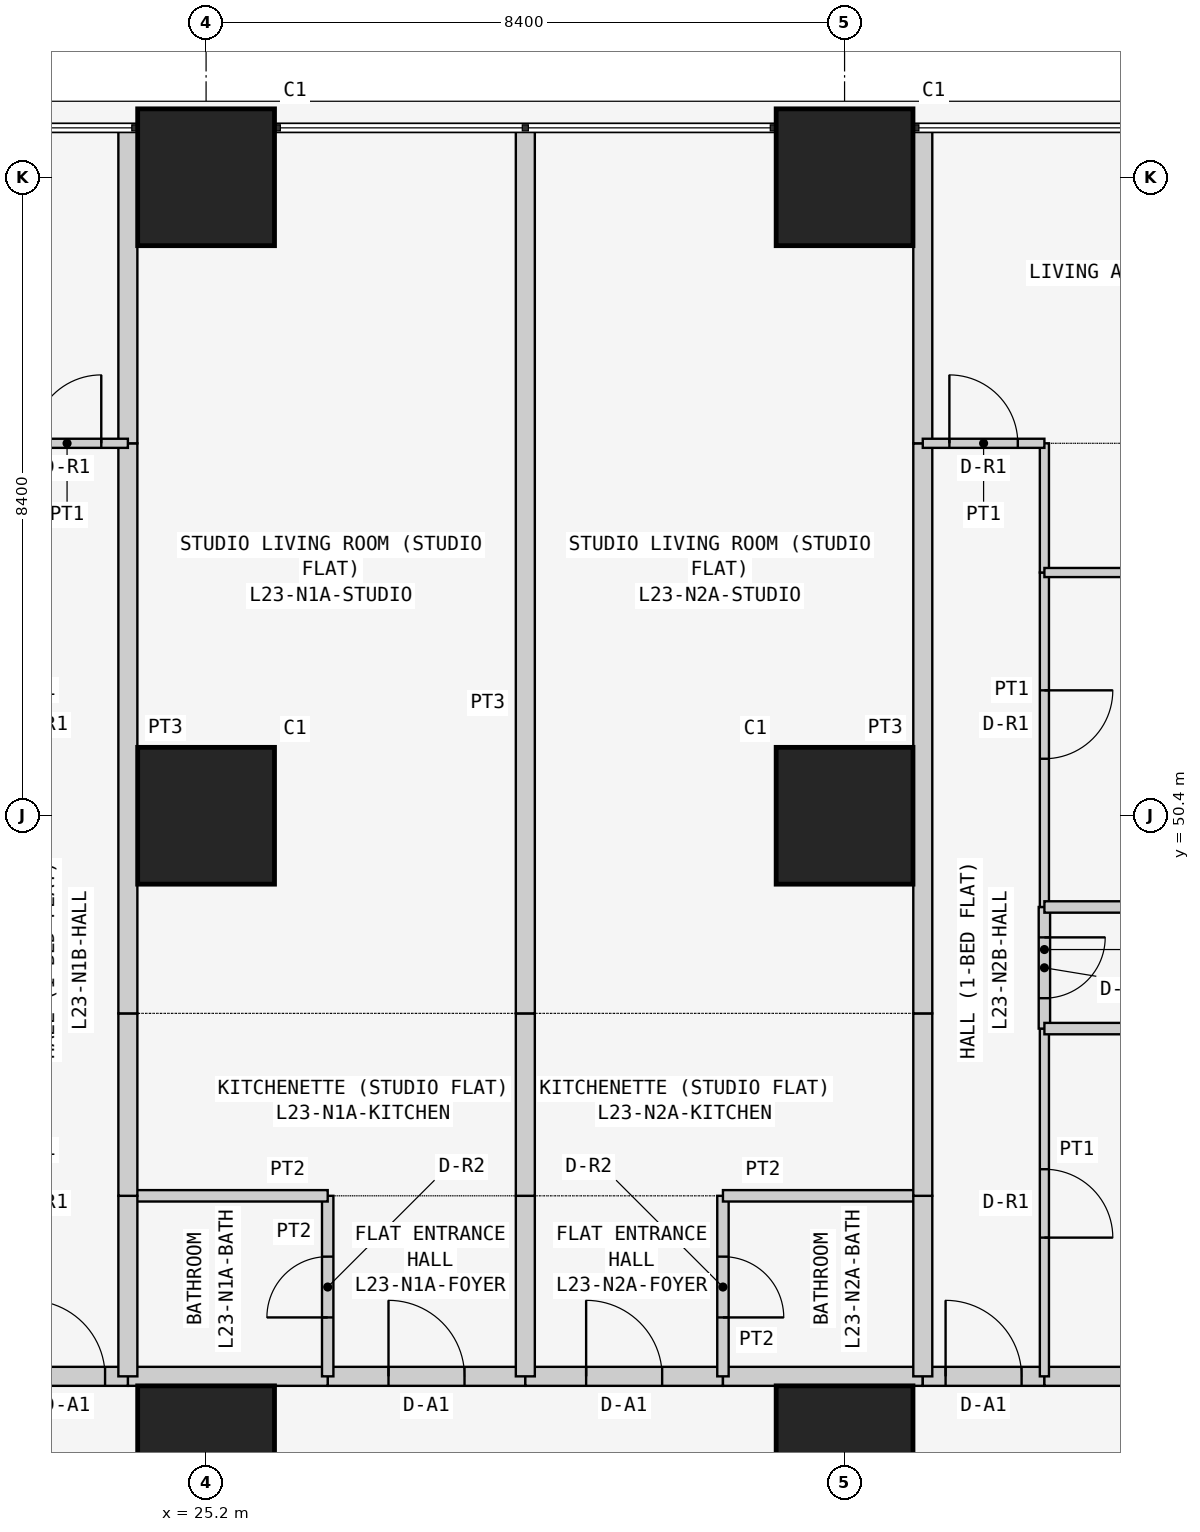
"""IFC4 building model, lengths in metres.
Left out: names, types, materials, properties, quantities, classifications, styles, units other than length and angle.
Written with IfcOpenShell. Run it as: python <this file> out.ifc"""

import sys

from ifc_helpers import new_model, si_unit, direction, frame, frame_2d, origin, origin_2d, place, context, subcontext, project, spatial, rectangle, extrude, element, fill, save


model = new_model("IFC4")
c1 = context("Model", 3, precision=1e-05, world=origin(), true_north=direction((0.0, 1.0)))
c2 = subcontext(c1, "Body", "Model", "MODEL_VIEW")
j1 = project(units=[si_unit("LENGTHUNIT", "METRE"), si_unit("PLANEANGLEUNIT", "RADIAN")], contexts=[c1])
p1 = place(None, origin())
s1 = spatial("IfcSite", under=j1, at=p1, CompositionType="ELEMENT")
p2 = place(p1, origin())
s2 = spatial("IfcBuilding", under=s1, at=p2, CompositionType="ELEMENT")
p3 = place(p2, frame((0.0, 0.0, 92.1)))
s3 = spatial("IfcBuildingStorey", under=s2, at=p3, CompositionType="ELEMENT", Elevation=92.1)
for number, where, z_axis, x_axis in (
    (1, (25.2, 42.0, 0.0), (0.0, 0.0, 1.0), (1.0, 0.0, 0.0)),
    (2, (25.2, 50.4, 0.0), (0.0, 0.0, 1.0), (1.0, 0.0, 0.0)),
    (3, (25.2, 58.8, 0.0), (0.0, 0.0, 1.0), (1.0, 0.0, 0.0)),
    (4, (33.6, 42.0, 0.0), (0.0, 0.0, 1.0), (1.0, 0.0, 0.0)),
    (5, (33.6, 50.4, 0.0), (0.0, 0.0, 1.0), (1.0, 0.0, 0.0)),
    (6, (33.6, 58.8, 0.0), (0.0, 0.0, 1.0), (1.0, 0.0, 0.0)),
):
    element("IfcColumn", number, at=place(p3, frame(where, z_axis=z_axis, x_axis=x_axis)), inside=s3, PredefinedType="COLUMN", context=c2, shape_type="SweptSolid", body=[
        extrude(rectangle(XDim=1.8, YDim=1.8, at=origin_2d()), origin(), (0.0, 0.0, 1.0), 3.6),
    ])
p4 = place(p3, frame((26.8, 43.025, 0.0), z_axis=(0.0, 0.0, 1.0), x_axis=(1.0, 0.0, 0.0)))
e7 = element("IfcWall", 7, at=p4, inside=s3, PredefinedType="PARTITIONING", context=c2, shape_type="SweptSolid", body=[
    extrude(rectangle(XDim=2.6, YDim=0.25, at=frame_2d((1.3, 0.0))), origin(), (0.0, 0.0, 1.0), 3.45),
])
p5 = place(p4, frame((0.8, 0.0, 0.0)))
e8 = element("IfcOpeningElement", 8, at=p5, cuts=e7, PredefinedType="OPENING", context=c2, shape_type="SweptSolid", body=[
    extrude(rectangle(XDim=1.0, YDim=2.1, at=frame_2d((0.5, 1.05))), frame((0.0, 0.135, 0.0), z_axis=(0.0, -1.0, 0.0), x_axis=(1.0, 0.0, 0.0)), (0.0, 0.0, 1.0), 0.27),
])
p6 = place(p3, frame((24.171, 43.025, 0.0), z_axis=(0.0, 0.0, 1.0), x_axis=(1.0, 0.0, 0.0)))
e9 = element("IfcWall", 9, at=p6, inside=s3, PredefinedType="PARTITIONING", context=c2, shape_type="SweptSolid", body=[
    extrude(rectangle(XDim=2.629, YDim=0.25, at=frame_2d((1.314, 0.0))), origin(), (0.0, 0.0, 1.0), 3.45),
])
p7 = place(p3, frame((22.571, 43.025, 0.0), z_axis=(0.0, 0.0, 1.0), x_axis=(1.0, 0.0, 0.0)))
e10 = element("IfcWall", 10, at=p7, inside=s3, PredefinedType="PARTITIONING", context=c2, shape_type="SweptSolid", body=[
    extrude(rectangle(XDim=1.6, YDim=0.25, at=frame_2d((0.8, 0.0))), origin(), (0.0, 0.0, 1.0), 3.45),
])
p8 = place(p7, frame((0.3, 0.0, 0.0)))
e11 = element("IfcOpeningElement", 11, at=p8, cuts=e10, PredefinedType="OPENING", context=c2, shape_type="SweptSolid", body=[
    extrude(rectangle(XDim=1.0, YDim=2.1, at=frame_2d((0.5, 1.05))), frame((0.0, 0.135, 0.0), z_axis=(0.0, -1.0, 0.0), x_axis=(1.0, 0.0, 0.0)), (0.0, 0.0, 1.0), 0.27),
])
p9 = place(p3, frame((29.4, 43.025, 0.0), z_axis=(0.0, 0.0, 1.0), x_axis=(1.0, 0.0, 0.0)))
e12 = element("IfcWall", 12, at=p9, inside=s3, PredefinedType="PARTITIONING", context=c2, shape_type="SweptSolid", body=[
    extrude(rectangle(XDim=2.6, YDim=0.25, at=frame_2d((1.3, 0.0))), origin(), (0.0, 0.0, 1.0), 3.45),
])
p10 = place(p9, frame((0.8, 0.0, 0.0)))
e13 = element("IfcOpeningElement", 13, at=p10, cuts=e12, PredefinedType="OPENING", context=c2, shape_type="SweptSolid", body=[
    extrude(rectangle(XDim=1.0, YDim=2.1, at=frame_2d((0.5, 1.05))), frame((0.0, 0.135, 0.0), z_axis=(0.0, -1.0, 0.0), x_axis=(1.0, 0.0, 0.0)), (0.0, 0.0, 1.0), 0.27),
])
p11 = place(p3, frame((32.0, 43.025, 0.0), z_axis=(0.0, 0.0, 1.0), x_axis=(1.0, 0.0, 0.0)))
e14 = element("IfcWall", 14, at=p11, inside=s3, PredefinedType="PARTITIONING", context=c2, shape_type="SweptSolid", body=[
    extrude(rectangle(XDim=2.629, YDim=0.25, at=frame_2d((1.314, 0.0))), origin(), (0.0, 0.0, 1.0), 3.45),
])
p12 = place(p3, frame((34.629, 43.025, 0.0), z_axis=(0.0, 0.0, 1.0), x_axis=(1.0, 0.0, 0.0)))
e15 = element("IfcWall", 15, at=p12, inside=s3, PredefinedType="PARTITIONING", context=c2, shape_type="SweptSolid", body=[
    extrude(rectangle(XDim=1.6, YDim=0.25, at=frame_2d((0.8, 0.0))), origin(), (0.0, 0.0, 1.0), 3.45),
])
p13 = place(p12, frame((0.3, 0.0, 0.0)))
e16 = element("IfcOpeningElement", 16, at=p13, cuts=e15, PredefinedType="OPENING", context=c2, shape_type="SweptSolid", body=[
    extrude(rectangle(XDim=1.0, YDim=2.1, at=frame_2d((0.5, 1.05))), frame((0.0, 0.135, 0.0), z_axis=(0.0, -1.0, 0.0), x_axis=(1.0, 0.0, 0.0)), (0.0, 0.0, 1.0), 0.27),
])
p14 = place(p3, frame((36.229, 43.025, 0.0), z_axis=(0.0, 0.0, 1.0), x_axis=(1.0, 0.0, 0.0)))
e17 = element("IfcWall", 17, at=p14, inside=s3, PredefinedType="PARTITIONING", context=c2, shape_type="SweptSolid", body=[
    extrude(rectangle(XDim=6.471, YDim=0.25, at=frame_2d((3.235, 0.0))), origin(), (0.0, 0.0, 1.0), 3.45),
])
p15 = place(p3, frame((26.8, 45.4, 0.0), z_axis=(0.0, 0.0, 1.0), x_axis=(0.0, -1.0, 0.0)))
e18 = element("IfcWall", 18, at=p15, inside=s3, PredefinedType="PARTITIONING", context=c2, shape_type="SweptSolid", body=[
    extrude(rectangle(XDim=2.375, YDim=0.15, at=frame_2d((1.188, 0.0))), origin(), (0.0, 0.0, 1.0), 3.45),
])
p16 = place(p15, frame((0.8, 0.0, 0.0)))
e19 = element("IfcOpeningElement", 19, at=p16, cuts=e18, PredefinedType="OPENING", context=c2, shape_type="SweptSolid", body=[
    extrude(rectangle(XDim=0.8, YDim=2.1, at=frame_2d((0.4, 1.05))), frame((0.0, 0.085, 0.0), z_axis=(0.0, -1.0, 0.0), x_axis=(1.0, 0.0, 0.0)), (0.0, 0.0, 1.0), 0.17),
])
p17 = place(p3, frame((29.4, 43.025, 0.0), z_axis=(0.0, 0.0, 1.0), x_axis=(0.0, 1.0, 0.0)))
e20 = element("IfcWall", 20, at=p17, inside=s3, PredefinedType="PARTITIONING", context=c2, shape_type="SweptSolid", body=[
    extrude(rectangle(XDim=2.375, YDim=0.25, at=frame_2d((1.188, 0.0))), origin(), (0.0, 0.0, 1.0), 2.848),
])
p18 = place(p3, frame((26.8, 45.4, 0.0), z_axis=(0.0, 0.0, 1.0), x_axis=(-1.0, 0.0, 0.0)))
e21 = element("IfcWall", 21, at=p18, inside=s3, PredefinedType="PARTITIONING", context=c2, shape_type="SweptSolid", body=[
    extrude(rectangle(XDim=2.629, YDim=0.15, at=frame_2d((1.314, 0.0))), origin(), (0.0, 0.0, 1.0), 3.45),
])
p19 = place(p3, frame((24.171, 45.4, 0.0), z_axis=(0.0, 0.0, 1.0), x_axis=(0.0, -1.0, 0.0)))
e22 = element("IfcWall", 22, at=p19, inside=s3, PredefinedType="PARTITIONING", context=c2, shape_type="SweptSolid", body=[
    extrude(rectangle(XDim=2.375, YDim=0.25, at=frame_2d((1.188, 0.0))), origin(), (0.0, 0.0, 1.0), 3.45),
])
p20 = place(p3, frame((24.171, 47.8, 0.0), z_axis=(0.0, 0.0, 1.0), x_axis=(0.0, -1.0, 0.0)))
e23 = element("IfcWall", 23, at=p20, inside=s3, PredefinedType="PARTITIONING", context=c2, shape_type="SweptSolid", body=[
    extrude(rectangle(XDim=2.4, YDim=0.25, at=frame_2d((1.2, 0.0))), origin(), (0.0, 0.0, 1.0), 3.45),
])
p21 = place(p3, frame((29.4, 45.4, 0.0), z_axis=(0.0, 0.0, 1.0), x_axis=(0.0, 1.0, 0.0)))
e24 = element("IfcWall", 24, at=p21, inside=s3, PredefinedType="PARTITIONING", context=c2, shape_type="SweptSolid", body=[
    extrude(rectangle(XDim=2.4, YDim=0.25, at=frame_2d((1.2, 0.0))), origin(), (0.0, 0.0, 1.0), 2.848),
])
p22 = place(p3, frame((24.171, 55.3, 0.0), z_axis=(0.0, 0.0, 1.0), x_axis=(0.0, -1.0, 0.0)))
e25 = element("IfcWall", 25, at=p22, inside=s3, PredefinedType="PARTITIONING", context=c2, shape_type="SweptSolid", body=[
    extrude(rectangle(XDim=7.5, YDim=0.25, at=frame_2d((3.75, 0.0))), origin(), (0.0, 0.0, 1.0), 3.45),
])
p23 = place(p3, frame((24.171, 59.45, 0.0), z_axis=(0.0, 0.0, 1.0), x_axis=(0.0, -1.0, 0.0)))
e26 = element("IfcWall", 26, at=p23, inside=s3, PredefinedType="PARTITIONING", context=c2, shape_type="SweptSolid", body=[
    extrude(rectangle(XDim=4.15, YDim=0.25, at=frame_2d((2.075, 0.0))), origin(), (0.0, 0.0, 1.0), 3.45),
])
p24 = place(p3, frame((29.4, 47.8, 0.0), z_axis=(0.0, 0.0, 1.0), x_axis=(0.0, 1.0, 0.0)))
e27 = element("IfcWall", 27, at=p24, inside=s3, PredefinedType="PARTITIONING", context=c2, shape_type="SweptSolid", body=[
    extrude(rectangle(XDim=11.65, YDim=0.25, at=frame_2d((5.825, 0.0))), origin(), (0.0, 0.0, 1.0), 2.848),
])
p25 = place(p3, frame((24.171, 55.3, 0.0), z_axis=(0.0, 0.0, 1.0), x_axis=(-1.0, 0.0, 0.0)))
e28 = element("IfcWall", 28, at=p25, inside=s3, PredefinedType="PARTITIONING", context=c2, shape_type="SweptSolid", body=[
    extrude(rectangle(XDim=1.6, YDim=0.12, at=frame_2d((0.8, 0.0))), origin(), (0.0, 0.0, 1.0), 3.45),
])
p26 = place(p25, frame((0.35, 0.0, 0.0)))
e29 = element("IfcOpeningElement", 29, at=p26, cuts=e28, PredefinedType="OPENING", context=c2, shape_type="SweptSolid", body=[
    extrude(rectangle(XDim=0.9, YDim=2.1, at=frame_2d((0.45, 1.05))), frame((0.0, 0.07, 0.0), z_axis=(0.0, -1.0, 0.0), x_axis=(1.0, 0.0, 0.0)), (0.0, 0.0, 1.0), 0.14),
])
p27 = place(p3, frame((32.0, 45.4, 0.0), z_axis=(0.0, 0.0, 1.0), x_axis=(0.0, -1.0, 0.0)))
e30 = element("IfcWall", 30, at=p27, inside=s3, PredefinedType="PARTITIONING", context=c2, shape_type="SweptSolid", body=[
    extrude(rectangle(XDim=2.375, YDim=0.15, at=frame_2d((1.188, 0.0))), origin(), (0.0, 0.0, 1.0), 3.45),
])
p28 = place(p27, frame((0.8, 0.0, 0.0)))
e31 = element("IfcOpeningElement", 31, at=p28, cuts=e30, PredefinedType="OPENING", context=c2, shape_type="SweptSolid", body=[
    extrude(rectangle(XDim=0.8, YDim=2.1, at=frame_2d((0.4, 1.05))), frame((0.0, 0.085, 0.0), z_axis=(0.0, -1.0, 0.0), x_axis=(1.0, 0.0, 0.0)), (0.0, 0.0, 1.0), 0.17),
])
p29 = place(p3, frame((32.0, 45.4, 0.0), z_axis=(0.0, 0.0, 1.0), x_axis=(1.0, 0.0, 0.0)))
e32 = element("IfcWall", 32, at=p29, inside=s3, PredefinedType="PARTITIONING", context=c2, shape_type="SweptSolid", body=[
    extrude(rectangle(XDim=2.629, YDim=0.15, at=frame_2d((1.314, 0.0))), origin(), (0.0, 0.0, 1.0), 3.45),
])
p30 = place(p3, frame((34.629, 45.4, 0.0), z_axis=(0.0, 0.0, 1.0), x_axis=(0.0, -1.0, 0.0)))
e33 = element("IfcWall", 33, at=p30, inside=s3, PredefinedType="PARTITIONING", context=c2, shape_type="SweptSolid", body=[
    extrude(rectangle(XDim=2.375, YDim=0.25, at=frame_2d((1.188, 0.0))), origin(), (0.0, 0.0, 1.0), 3.45),
])
p31 = place(p3, frame((34.629, 47.8, 0.0), z_axis=(0.0, 0.0, 1.0), x_axis=(0.0, -1.0, 0.0)))
e34 = element("IfcWall", 34, at=p31, inside=s3, PredefinedType="PARTITIONING", context=c2, shape_type="SweptSolid", body=[
    extrude(rectangle(XDim=2.4, YDim=0.25, at=frame_2d((1.2, 0.0))), origin(), (0.0, 0.0, 1.0), 3.45),
])
p32 = place(p3, frame((34.629, 55.3, 0.0), z_axis=(0.0, 0.0, 1.0), x_axis=(0.0, -1.0, 0.0)))
e35 = element("IfcWall", 35, at=p32, inside=s3, PredefinedType="PARTITIONING", context=c2, shape_type="SweptSolid", body=[
    extrude(rectangle(XDim=7.5, YDim=0.25, at=frame_2d((3.75, 0.0))), origin(), (0.0, 0.0, 1.0), 3.45),
])
p33 = place(p3, frame((34.629, 59.45, 0.0), z_axis=(0.0, 0.0, 1.0), x_axis=(0.0, -1.0, 0.0)))
e36 = element("IfcWall", 36, at=p33, inside=s3, PredefinedType="PARTITIONING", context=c2, shape_type="SweptSolid", body=[
    extrude(rectangle(XDim=4.15, YDim=0.25, at=frame_2d((2.075, 0.0))), origin(), (0.0, 0.0, 1.0), 3.45),
])
p34 = place(p3, frame((36.229, 47.6, 0.0), z_axis=(0.0, 0.0, 1.0), x_axis=(0.0, -1.0, 0.0)))
e37 = element("IfcWall", 37, at=p34, inside=s3, PredefinedType="PARTITIONING", context=c2, shape_type="SweptSolid", body=[
    extrude(rectangle(XDim=4.575, YDim=0.12, at=frame_2d((2.288, 0.0))), origin(), (0.0, 0.0, 1.0), 3.45),
])
p35 = place(p34, frame((1.85, 0.0, 0.0)))
e38 = element("IfcOpeningElement", 38, at=p35, cuts=e37, PredefinedType="OPENING", context=c2, shape_type="SweptSolid", body=[
    extrude(rectangle(XDim=0.9, YDim=2.1, at=frame_2d((0.45, 1.05))), frame((0.0, 0.07, 0.0), z_axis=(0.0, -1.0, 0.0), x_axis=(1.0, 0.0, 0.0)), (0.0, 0.0, 1.0), 0.14),
])
p36 = place(p3, frame((36.229, 49.2, 0.0), z_axis=(0.0, 0.0, 1.0), x_axis=(0.0, -1.0, 0.0)))
e39 = element("IfcWall", 39, at=p36, inside=s3, PredefinedType="PARTITIONING", context=c2, shape_type="SweptSolid", body=[
    extrude(rectangle(XDim=1.6, YDim=0.15, at=frame_2d((0.8, 0.0))), origin(), (0.0, 0.0, 1.0), 3.45),
])
p37 = place(p36, frame((0.4, 0.0, 0.0)))
e40 = element("IfcOpeningElement", 40, at=p37, cuts=e39, PredefinedType="OPENING", context=c2, shape_type="SweptSolid", body=[
    extrude(rectangle(XDim=0.8, YDim=2.1, at=frame_2d((0.4, 1.05))), frame((0.0, 0.085, 0.0), z_axis=(0.0, -1.0, 0.0), x_axis=(1.0, 0.0, 0.0)), (0.0, 0.0, 1.0), 0.17),
])
p38 = place(p3, frame((36.229, 53.6, 0.0), z_axis=(0.0, 0.0, 1.0), x_axis=(0.0, -1.0, 0.0)))
e41 = element("IfcWall", 41, at=p38, inside=s3, PredefinedType="PARTITIONING", context=c2, shape_type="SweptSolid", body=[
    extrude(rectangle(XDim=4.4, YDim=0.12, at=frame_2d((2.2, 0.0))), origin(), (0.0, 0.0, 1.0), 3.45),
])
p39 = place(p38, frame((1.55, 0.0, 0.0)))
e42 = element("IfcOpeningElement", 42, at=p39, cuts=e41, PredefinedType="OPENING", context=c2, shape_type="SweptSolid", body=[
    extrude(rectangle(XDim=0.9, YDim=2.1, at=frame_2d((0.45, 1.05))), frame((0.0, 0.07, 0.0), z_axis=(0.0, -1.0, 0.0), x_axis=(1.0, 0.0, 0.0)), (0.0, 0.0, 1.0), 0.14),
])
p40 = place(p3, frame((36.229, 55.3, 0.0), z_axis=(0.0, 0.0, 1.0), x_axis=(0.0, -1.0, 0.0)))
e43 = element("IfcWall", 43, at=p40, inside=s3, PredefinedType="PARTITIONING", context=c2, shape_type="SweptSolid", body=[
    extrude(rectangle(XDim=1.7, YDim=0.12, at=frame_2d((0.85, 0.0))), origin(), (0.0, 0.0, 1.0), 3.45),
])
p41 = place(p3, frame((34.629, 55.3, 0.0), z_axis=(0.0, 0.0, 1.0), x_axis=(1.0, 0.0, 0.0)))
e44 = element("IfcWall", 44, at=p41, inside=s3, PredefinedType="PARTITIONING", context=c2, shape_type="SweptSolid", body=[
    extrude(rectangle(XDim=1.6, YDim=0.12, at=frame_2d((0.8, 0.0))), origin(), (0.0, 0.0, 1.0), 3.45),
])
p42 = place(p41, frame((0.35, 0.0, 0.0)))
e45 = element("IfcOpeningElement", 45, at=p42, cuts=e44, PredefinedType="OPENING", context=c2, shape_type="SweptSolid", body=[
    extrude(rectangle(XDim=0.9, YDim=2.1, at=frame_2d((0.45, 1.05))), frame((0.0, 0.07, 0.0), z_axis=(0.0, -1.0, 0.0), x_axis=(1.0, 0.0, 0.0)), (0.0, 0.0, 1.0), 0.14),
])
for number, where, z_axis, x_axis in (
    (46, (36.229, 47.6, 0.0), (0.0, 0.0, 1.0), (1.0, 0.0, 0.0)),
    (47, (36.229, 49.2, 0.0), (0.0, 0.0, 1.0), (1.0, 0.0, 0.0)),
):
    element("IfcWall", number, at=place(p3, frame(where, z_axis=z_axis, x_axis=x_axis)), inside=s3, PredefinedType="PARTITIONING", context=c2, shape_type="SweptSolid", body=[
        extrude(rectangle(XDim=6.471, YDim=0.15, at=frame_2d((3.235, 0.0))), origin(), (0.0, 0.0, 1.0), 3.45),
    ])
p43 = place(p3, frame((36.229, 53.6, 0.0), z_axis=(0.0, 0.0, 1.0), x_axis=(1.0, 0.0, 0.0)))
e48 = element("IfcWall", 48, at=p43, inside=s3, PredefinedType="PARTITIONING", context=c2, shape_type="SweptSolid", body=[
    extrude(rectangle(XDim=6.471, YDim=0.12, at=frame_2d((3.235, 0.0))), origin(), (0.0, 0.0, 1.0), 3.45),
])
p44 = place(p5, origin())
e49 = element("IfcDoor", 49, at=p44, inside=s3, OperationType="SINGLE_SWING_LEFT", PredefinedType="DOOR", context=c2, shape_type="SweptSolid", body=[
    extrude(rectangle(XDim=1.0, YDim=2.1, at=frame_2d((0.5, 1.05))), frame((0.0, 0.025, 0.0), z_axis=(0.0, -1.0, 0.0), x_axis=(1.0, 0.0, 0.0)), (0.0, 0.0, 1.0), 0.05),
])
fill(e8, e49)
p45 = place(p16, frame((0.8, 0.0, 0.0), z_axis=(0.0, 0.0, 1.0), x_axis=(-1.0, 0.0, 0.0)))
e50 = element("IfcDoor", 50, at=p45, inside=s3, OperationType="SINGLE_SWING_LEFT", PredefinedType="DOOR", context=c2, shape_type="SweptSolid", body=[
    extrude(rectangle(XDim=0.8, YDim=2.1, at=frame_2d((0.4, 1.05))), frame((0.0, 0.025, 0.0), z_axis=(0.0, -1.0, 0.0), x_axis=(1.0, 0.0, 0.0)), (0.0, 0.0, 1.0), 0.05),
])
fill(e19, e50)
p46 = place(p8, origin())
e51 = element("IfcDoor", 51, at=p46, inside=s3, OperationType="SINGLE_SWING_LEFT", PredefinedType="DOOR", context=c2, shape_type="SweptSolid", body=[
    extrude(rectangle(XDim=1.0, YDim=2.1, at=frame_2d((0.5, 1.05))), frame((0.0, 0.025, 0.0), z_axis=(0.0, -1.0, 0.0), x_axis=(1.0, 0.0, 0.0)), (0.0, 0.0, 1.0), 0.05),
])
fill(e11, e51)
p47 = place(p26, frame((0.9, 0.0, 0.0), z_axis=(0.0, 0.0, 1.0), x_axis=(-1.0, 0.0, 0.0)))
e52 = element("IfcDoor", 52, at=p47, inside=s3, OperationType="SINGLE_SWING_RIGHT", PredefinedType="DOOR", context=c2, shape_type="SweptSolid", body=[
    extrude(rectangle(XDim=0.9, YDim=2.1, at=frame_2d((0.45, 1.05))), frame((0.0, 0.025, 0.0), z_axis=(0.0, -1.0, 0.0), x_axis=(1.0, 0.0, 0.0)), (0.0, 0.0, 1.0), 0.05),
])
fill(e29, e52)
p48 = place(p10, origin())
e53 = element("IfcDoor", 53, at=p48, inside=s3, OperationType="SINGLE_SWING_LEFT", PredefinedType="DOOR", context=c2, shape_type="SweptSolid", body=[
    extrude(rectangle(XDim=1.0, YDim=2.1, at=frame_2d((0.5, 1.05))), frame((0.0, 0.025, 0.0), z_axis=(0.0, -1.0, 0.0), x_axis=(1.0, 0.0, 0.0)), (0.0, 0.0, 1.0), 0.05),
])
fill(e13, e53)
p49 = place(p28, origin())
e54 = element("IfcDoor", 54, at=p49, inside=s3, OperationType="SINGLE_SWING_RIGHT", PredefinedType="DOOR", context=c2, shape_type="SweptSolid", body=[
    extrude(rectangle(XDim=0.8, YDim=2.1, at=frame_2d((0.4, 1.05))), frame((0.0, 0.025, 0.0), z_axis=(0.0, -1.0, 0.0), x_axis=(1.0, 0.0, 0.0)), (0.0, 0.0, 1.0), 0.05),
])
fill(e31, e54)
p50 = place(p13, origin())
e55 = element("IfcDoor", 55, at=p50, inside=s3, OperationType="SINGLE_SWING_LEFT", PredefinedType="DOOR", context=c2, shape_type="SweptSolid", body=[
    extrude(rectangle(XDim=1.0, YDim=2.1, at=frame_2d((0.5, 1.05))), frame((0.0, 0.025, 0.0), z_axis=(0.0, -1.0, 0.0), x_axis=(1.0, 0.0, 0.0)), (0.0, 0.0, 1.0), 0.05),
])
fill(e16, e55)
p51 = place(p35, origin())
e56 = element("IfcDoor", 56, at=p51, inside=s3, OperationType="SINGLE_SWING_RIGHT", PredefinedType="DOOR", context=c2, shape_type="SweptSolid", body=[
    extrude(rectangle(XDim=0.9, YDim=2.1, at=frame_2d((0.45, 1.05))), frame((0.0, 0.025, 0.0), z_axis=(0.0, -1.0, 0.0), x_axis=(1.0, 0.0, 0.0)), (0.0, 0.0, 1.0), 0.05),
])
fill(e38, e56)
p52 = place(p37, origin())
e57 = element("IfcDoor", 57, at=p52, inside=s3, OperationType="SINGLE_SWING_LEFT", PredefinedType="DOOR", context=c2, shape_type="SweptSolid", body=[
    extrude(rectangle(XDim=0.8, YDim=2.1, at=frame_2d((0.4, 1.05))), frame((0.0, 0.025, 0.0), z_axis=(0.0, -1.0, 0.0), x_axis=(1.0, 0.0, 0.0)), (0.0, 0.0, 1.0), 0.05),
])
fill(e40, e57)
p53 = place(p39, origin())
e58 = element("IfcDoor", 58, at=p53, inside=s3, OperationType="SINGLE_SWING_LEFT", PredefinedType="DOOR", context=c2, shape_type="SweptSolid", body=[
    extrude(rectangle(XDim=0.9, YDim=2.1, at=frame_2d((0.45, 1.05))), frame((0.0, 0.025, 0.0), z_axis=(0.0, -1.0, 0.0), x_axis=(1.0, 0.0, 0.0)), (0.0, 0.0, 1.0), 0.05),
])
fill(e42, e58)
p54 = place(p42, origin())
e59 = element("IfcDoor", 59, at=p54, inside=s3, OperationType="SINGLE_SWING_LEFT", PredefinedType="DOOR", context=c2, shape_type="SweptSolid", body=[
    extrude(rectangle(XDim=0.9, YDim=2.1, at=frame_2d((0.45, 1.05))), frame((0.0, 0.025, 0.0), z_axis=(0.0, -1.0, 0.0), x_axis=(1.0, 0.0, 0.0)), (0.0, 0.0, 1.0), 0.05),
])
fill(e45, e59)
save(model, sys.argv[1])
